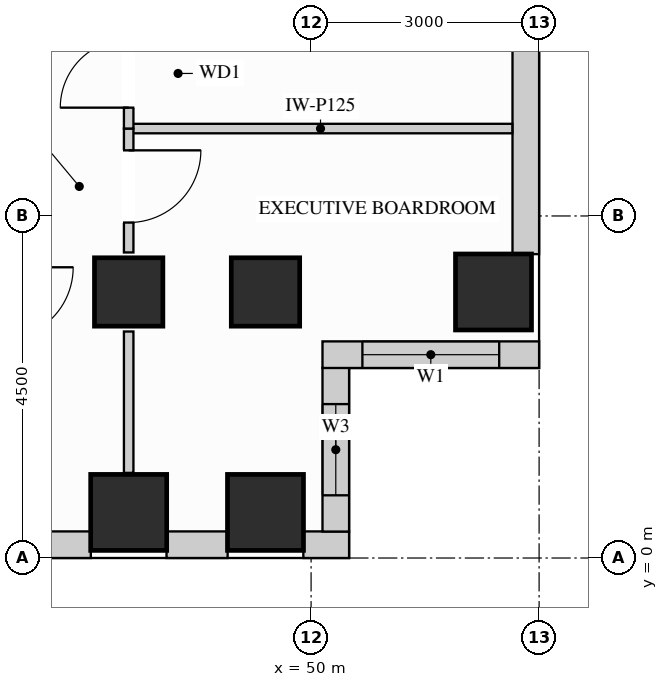
"""IFC4 building model, lengths in metres.
Left out: names, types, materials, properties, quantities, classifications, styles, units other than length and angle.
Written with IfcOpenShell. Run it as: python <this file> out.ifc"""

import sys

from ifc_helpers import new_model, si_unit, direction, frame, frame_2d, origin, origin_2d, place, context, subcontext, project, spatial, rectangle, extrude, source, transform, mapped, element, fill, save


model = new_model("IFC4")
c1 = context("Model", 3, precision=1e-05, world=origin(), true_north=direction((0.0, 1.0)))
c2 = subcontext(c1, "Body", "Model", "MODEL_VIEW")
j1 = project(units=[si_unit("LENGTHUNIT", "METRE"), si_unit("PLANEANGLEUNIT", "RADIAN")], contexts=[c1])
p1 = place(None, origin())
s1 = spatial("IfcSite", under=j1, at=p1, CompositionType="ELEMENT")
p2 = place(p1, origin())
s2 = spatial("IfcBuilding", under=s1, at=p2, CompositionType="ELEMENT")
p3 = place(p2, frame((0.0, 0.0, 204.3)))
s3 = spatial("IfcBuildingStorey", under=s2, at=p3, CompositionType="ELEMENT", Elevation=204.3)
m1 = source(origin(), c2, "Body", "SweptSolid", [
    extrude(rectangle(XDim=0.9, YDim=0.9, at=origin_2d()), origin(), (0.0, 0.0, 1.0), 3.32),
])
for number, where, z_axis, x_axis in (
    (1, (47.6, 3.5, 0.0), (0.0, 0.0, 1.0), (1.0, 0.0, 0.0)),
    (2, (49.4, 3.5, 0.0), (0.0, 0.0, 1.0), (1.0, 0.0, 0.0)),
):
    element("IfcColumn", number, at=place(p3, frame(where, z_axis=z_axis, x_axis=x_axis)), inside=s3, PredefinedType="COLUMN", context=c2, shape_type="MappedRepresentation", body=[
        mapped(m1, transform((0.0, 0.0, 0.0), x_axis=(1.0, 0.0, 0.0), y_axis=(0.0, 1.0, 0.0), z_axis=(0.0, 0.0, 1.0))),
    ])
m2 = source(origin(), c2, "Body", "SweptSolid", [
    extrude(rectangle(XDim=1.0, YDim=1.0, at=origin_2d()), origin(), (0.0, 0.0, 1.0), 3.32),
])
for number, where, z_axis, x_axis in (
    (3, (52.4, 3.5, 0.0), (0.0, 0.0, 1.0), (1.0, 0.0, 0.0)),
    (4, (47.6, 0.6, 0.0), (0.0, 0.0, 1.0), (1.0, 0.0, 0.0)),
    (5, (49.4, 0.6, 0.0), (0.0, 0.0, 1.0), (1.0, 0.0, 0.0)),
):
    element("IfcColumn", number, at=place(p3, frame(where, z_axis=z_axis, x_axis=x_axis)), inside=s3, PredefinedType="COLUMN", context=c2, shape_type="MappedRepresentation", body=[
        mapped(m2, transform((0.0, 0.0, 0.0), x_axis=(1.0, 0.0, 0.0), y_axis=(0.0, 1.0, 0.0), z_axis=(0.0, 0.0, 1.0))),
    ])
p4 = place(p3, frame((40.498, 0.175, 0.0), z_axis=(0.0, 0.0, 1.0), x_axis=(1.0, 0.0, 0.0)))
e6 = element("IfcWall", 6, at=p4, inside=s3, PredefinedType="SOLIDWALL", context=c2, shape_type="SweptSolid", body=[
    extrude(rectangle(XDim=6.604, YDim=0.35, at=frame_2d((3.302, 0.0))), origin(), (0.0, 0.0, 1.0), 2.532),
])
p5 = place(p4, frame((0.737, 0.0, 0.78)))
e7 = element("IfcOpeningElement", 7, at=p5, cuts=e6, PredefinedType="OPENING", context=c2, shape_type="SweptSolid", body=[
    extrude(rectangle(XDim=1.8, YDim=1.572, at=frame_2d((0.9, 0.786))), frame((0.0, 0.185, 0.0), z_axis=(0.0, -1.0, 0.0), x_axis=(1.0, 0.0, 0.0)), (0.0, 0.0, 1.0), 0.37),
])
p6 = place(p4, frame((2.955, 0.0, 0.78)))
e8 = element("IfcOpeningElement", 8, at=p6, cuts=e6, PredefinedType="OPENING", context=c2, shape_type="SweptSolid", body=[
    extrude(rectangle(XDim=1.8, YDim=1.572, at=frame_2d((0.9, 0.786))), frame((0.0, 0.185, 0.0), z_axis=(0.0, -1.0, 0.0), x_axis=(1.0, 0.0, 0.0)), (0.0, 0.0, 1.0), 0.37),
])
m3 = source(origin(), c2, "Body", "SweptSolid", [
    extrude(rectangle(XDim=0.804, YDim=0.35, at=frame_2d((0.402, 0.0))), origin(), (0.0, 0.0, 1.0), 3.305),
])
p7 = place(p3, frame((48.098, 0.175, 0.0), z_axis=(0.0, 0.0, 1.0), x_axis=(1.0, 0.0, 0.0)))
e9 = element("IfcWall", 9, at=p7, inside=s3, PredefinedType="SOLIDWALL", context=c2, shape_type="MappedRepresentation", body=[
    mapped(m3, transform((0.0, 0.0, 0.0), x_axis=(1.0, 0.0, 0.0), y_axis=(0.0, 1.0, 0.0), z_axis=(0.0, 0.0, 1.0))),
])
m4 = source(origin(), c2, "Body", "SweptSolid", [
    extrude(rectangle(XDim=0.602, YDim=0.35, at=frame_2d((0.301, 0.0))), origin(), (0.0, 0.0, 1.0), 3.305),
])
p8 = place(p3, frame((49.898, 0.175, 0.0), z_axis=(0.0, 0.0, 1.0), x_axis=(1.0, 0.0, 0.0)))
e10 = element("IfcWall", 10, at=p8, inside=s3, PredefinedType="SOLIDWALL", context=c2, shape_type="MappedRepresentation", body=[
    mapped(m4, transform((0.0, 0.0, 0.0), x_axis=(1.0, 0.0, 0.0), y_axis=(0.0, 1.0, 0.0), z_axis=(0.0, 0.0, 1.0))),
])
p9 = place(p3, frame((50.325, 0.348, 0.0), z_axis=(0.0, 0.0, 1.0), x_axis=(0.0, 1.0, 0.0)))
e11 = element("IfcWall", 11, at=p9, inside=s3, PredefinedType="SOLIDWALL", context=c2, shape_type="SweptSolid", body=[
    extrude(rectangle(XDim=2.154, YDim=0.35, at=frame_2d((1.077, 0.0))), origin(), (0.0, 0.0, 1.0), 3.305),
])
p10 = place(p9, frame((0.477, 0.0, 0.78)))
e12 = element("IfcOpeningElement", 12, at=p10, cuts=e11, PredefinedType="OPENING", context=c2, shape_type="SweptSolid", body=[
    extrude(rectangle(XDim=1.2, YDim=2.1, at=frame_2d((0.6, 1.05))), frame((0.0, 0.185, 0.0), z_axis=(0.0, -1.0, 0.0), x_axis=(1.0, 0.0, 0.0)), (0.0, 0.0, 1.0), 0.37),
])
p11 = place(p3, frame((50.15, 2.675, 0.0), z_axis=(0.0, 0.0, 1.0), x_axis=(1.0, 0.0, 0.0)))
e13 = element("IfcWall", 13, at=p11, inside=s3, PredefinedType="SOLIDWALL", context=c2, shape_type="SweptSolid", body=[
    extrude(rectangle(XDim=2.85, YDim=0.35, at=frame_2d((1.425, 0.0))), origin(), (0.0, 0.0, 1.0), 3.305),
])
p12 = place(p11, frame((0.525, 0.0, 0.78)))
e14 = element("IfcOpeningElement", 14, at=p12, cuts=e13, PredefinedType="OPENING", context=c2, shape_type="SweptSolid", body=[
    extrude(rectangle(XDim=1.8, YDim=2.1, at=frame_2d((0.9, 1.05))), frame((0.0, 0.185, 0.0), z_axis=(0.0, -1.0, 0.0), x_axis=(1.0, 0.0, 0.0)), (0.0, 0.0, 1.0), 0.37),
])
m5 = source(origin(), c2, "Body", "SweptSolid", [
    extrude(rectangle(XDim=3.504, YDim=0.35, at=frame_2d((1.752, 0.0))), origin(), (0.0, 0.0, 1.0), 2.532),
])
p13 = place(p3, frame((52.825, 3.998, 0.0), z_axis=(0.0, 0.0, 1.0), x_axis=(0.0, 1.0, 0.0)))
e15 = element("IfcWall", 15, at=p13, inside=s3, PredefinedType="SOLIDWALL", context=c2, shape_type="MappedRepresentation", body=[
    mapped(m5, transform((0.0, 0.0, 0.0), x_axis=(1.0, 0.0, 0.0), y_axis=(0.0, 1.0, 0.0), z_axis=(0.0, 0.0, 1.0))),
])
m6 = source(origin(), c2, "Body", "SweptSolid", [
    extrude(rectangle(XDim=5.048, YDim=0.125, at=frame_2d((2.524, 0.0))), origin(), (0.0, 0.0, 1.0), 3.305),
])
p14 = place(p3, frame((47.6, 5.65, 0.0), z_axis=(0.0, 0.0, 1.0), x_axis=(1.0, 0.0, 0.0)))
e16 = element("IfcWall", 16, at=p14, inside=s3, PredefinedType="PARTITIONING", context=c2, shape_type="MappedRepresentation", body=[
    mapped(m6, transform((0.0, 0.0, 0.0), x_axis=(1.0, 0.0, 0.0), y_axis=(0.0, 1.0, 0.0), z_axis=(0.0, 0.0, 1.0))),
])
p15 = place(p3, frame((47.6, 4.02, 0.0), z_axis=(0.0, 0.0, 1.0), x_axis=(0.0, 1.0, 0.0)))
e17 = element("IfcWall", 17, at=p15, inside=s3, PredefinedType="PARTITIONING", context=c2, shape_type="SweptSolid", body=[
    extrude(rectangle(XDim=1.63, YDim=0.125, at=frame_2d((0.815, 0.0))), origin(), (0.0, 0.0, 1.0), 2.693),
])
p16 = place(p15, frame((0.393, 0.0, 0.0)))
e18 = element("IfcOpeningElement", 18, at=p16, cuts=e17, PredefinedType="OPENING", context=c2, shape_type="SweptSolid", body=[
    extrude(rectangle(XDim=0.95, YDim=2.15, at=frame_2d((0.475, 1.075))), frame((0.0, 0.073, 0.0), z_axis=(0.0, -1.0, 0.0), x_axis=(1.0, 0.0, 0.0)), (0.0, 0.0, 1.0), 0.145),
])
m7 = source(origin(), c2, "Body", "SweptSolid", [
    extrude(rectangle(XDim=1.86, YDim=0.125, at=frame_2d((0.93, 0.0))), origin(), (0.0, 0.0, 1.0), 2.693),
])
p17 = place(p3, frame((47.6, 1.12, 0.0), z_axis=(0.0, 0.0, 1.0), x_axis=(0.0, 1.0, 0.0)))
e19 = element("IfcWall", 19, at=p17, inside=s3, PredefinedType="PARTITIONING", context=c2, shape_type="MappedRepresentation", body=[
    mapped(m7, transform((0.0, 0.0, 0.0), x_axis=(1.0, 0.0, 0.0), y_axis=(0.0, 1.0, 0.0), z_axis=(0.0, 0.0, 1.0))),
])
p18 = place(p3, frame((47.6, 5.65, 0.0), z_axis=(0.0, 0.0, 1.0), x_axis=(0.0, 1.0, 0.0)))
e20 = element("IfcWall", 20, at=p18, inside=s3, PredefinedType="PARTITIONING", context=c2, shape_type="SweptSolid", body=[
    extrude(rectangle(XDim=1.5, YDim=0.125, at=frame_2d((0.75, 0.0))), origin(), (0.0, 0.0, 1.0), 2.693),
])
p19 = place(p18, frame((0.275, 0.0, 0.0)))
e21 = element("IfcOpeningElement", 21, at=p19, cuts=e20, PredefinedType="OPENING", context=c2, shape_type="SweptSolid", body=[
    extrude(rectangle(XDim=0.9, YDim=2.15, at=frame_2d((0.45, 1.075))), frame((0.0, 0.073, 0.0), z_axis=(0.0, -1.0, 0.0), x_axis=(1.0, 0.0, 0.0)), (0.0, 0.0, 1.0), 0.145),
])
m8 = source(origin(), c2, "Body", "SweptSolid", [
    extrude(rectangle(XDim=0.95, YDim=2.15, at=frame_2d((0.475, 1.075))), frame((0.0, 0.025, 0.0), z_axis=(0.0, -1.0, 0.0), x_axis=(1.0, 0.0, 0.0)), (0.0, 0.0, 1.0), 0.05),
])
p20 = place(p16, origin())
e22 = element("IfcDoor", 22, at=p20, inside=s3, OperationType="SINGLE_SWING_RIGHT", PredefinedType="DOOR", context=c2, shape_type="MappedRepresentation", body=[
    mapped(m8, transform((0.0, 0.0, 0.0), x_axis=(1.0, 0.0, 0.0), y_axis=(0.0, 1.0, 0.0), z_axis=(0.0, 0.0, 1.0))),
])
fill(e18, e22)
m9 = source(origin(), c2, "Body", "SweptSolid", [
    extrude(rectangle(XDim=0.9, YDim=2.15, at=frame_2d((0.45, 1.075))), frame((0.0, 0.025, 0.0), z_axis=(0.0, -1.0, 0.0), x_axis=(1.0, 0.0, 0.0)), (0.0, 0.0, 1.0), 0.05),
])
p21 = place(p19, origin())
e23 = element("IfcDoor", 23, at=p21, inside=s3, OperationType="SINGLE_SWING_LEFT", PredefinedType="DOOR", context=c2, shape_type="MappedRepresentation", body=[
    mapped(m9, transform((0.0, 0.0, 0.0), x_axis=(1.0, 0.0, 0.0), y_axis=(0.0, 1.0, 0.0), z_axis=(0.0, 0.0, 1.0))),
])
fill(e21, e23)
m10 = source(origin(), c2, "Body", "SweptSolid", [
    extrude(rectangle(XDim=1.8, YDim=2.1, at=frame_2d((0.9, 1.05))), frame((0.0, 0.03, 0.0), z_axis=(0.0, -1.0, 0.0), x_axis=(1.0, 0.0, 0.0)), (0.0, 0.0, 1.0), 0.06),
])
p22 = place(p12, origin())
e24 = element("IfcWindow", 24, at=p22, inside=s3, PartitioningType="SINGLE_PANEL", PredefinedType="WINDOW", context=c2, shape_type="MappedRepresentation", body=[
    mapped(m10, transform((0.0, 0.0, 0.0), x_axis=(1.0, 0.0, 0.0), y_axis=(0.0, 1.0, 0.0), z_axis=(0.0, 0.0, 1.0))),
])
fill(e14, e24)
m11 = source(origin(), c2, "Body", "SweptSolid", [
    extrude(rectangle(XDim=1.2, YDim=2.1, at=frame_2d((0.6, 1.05))), frame((0.0, 0.03, 0.0), z_axis=(0.0, -1.0, 0.0), x_axis=(1.0, 0.0, 0.0)), (0.0, 0.0, 1.0), 0.06),
])
p23 = place(p10, origin())
e25 = element("IfcWindow", 25, at=p23, inside=s3, PartitioningType="SINGLE_PANEL", PredefinedType="WINDOW", context=c2, shape_type="MappedRepresentation", body=[
    mapped(m11, transform((0.0, 0.0, 0.0), x_axis=(1.0, 0.0, 0.0), y_axis=(0.0, 1.0, 0.0), z_axis=(0.0, 0.0, 1.0))),
])
fill(e12, e25)
save(model, sys.argv[1])
